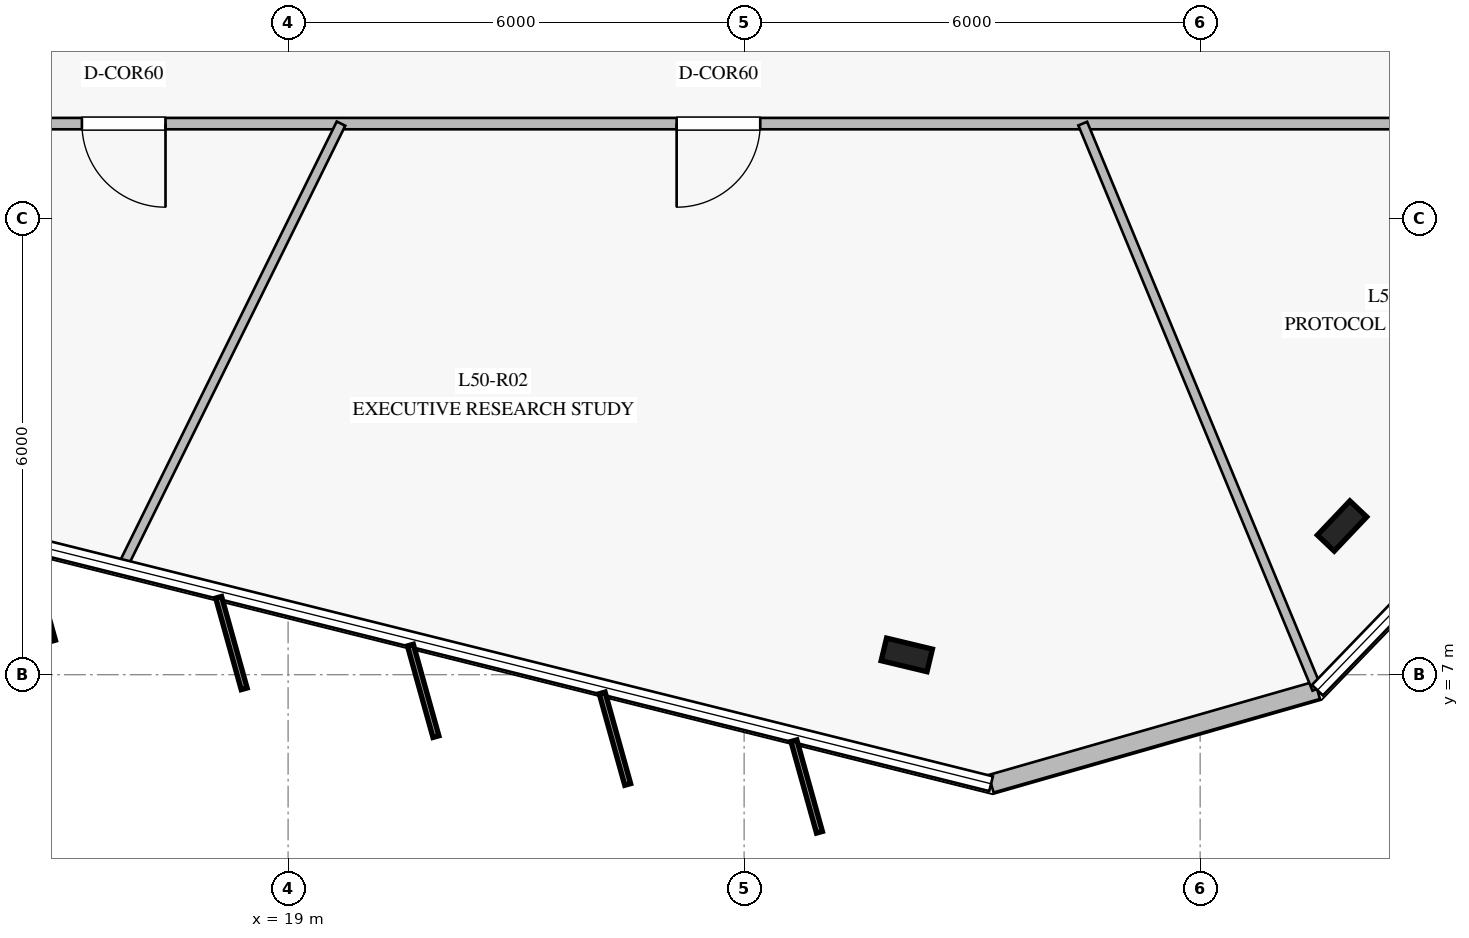
"""IFC4 building model, lengths in metres.
Left out: names, types, materials, properties, quantities, classifications, styles, units other than length and angle.
Written with IfcOpenShell. Run it as: python <this file> out.ifc"""

import sys

from ifc_helpers import new_model, si_unit, direction, frame, frame_2d, origin, origin_2d, place, context, subcontext, project, spatial, rectangle, i_section, extrude, element, fill, save


model = new_model("IFC4")
c1 = context("Model", 3, precision=1e-05, world=origin(), true_north=direction((0.0, 1.0)))
c2 = subcontext(c1, "Body", "Model", "MODEL_VIEW")
j1 = project(units=[si_unit("LENGTHUNIT", "METRE"), si_unit("PLANEANGLEUNIT", "RADIAN")], contexts=[c1])
p1 = place(None, origin())
s1 = spatial("IfcSite", under=j1, at=p1, CompositionType="ELEMENT")
p2 = place(p1, origin())
s2 = spatial("IfcBuilding", under=s1, at=p2, CompositionType="ELEMENT")
p3 = place(p2, frame((0.0, 0.0, 208.8)))
s3 = spatial("IfcBuildingStorey", under=s2, at=p3, CompositionType="ELEMENT", Elevation=208.8)
for number, where, z_axis, x_axis in (
    (1, (27.14, 7.26, 0.0), (0.0, 0.0, 1.0), (-0.972, 0.233, 0.0)),
    (2, (32.867, 8.956, 0.0), (0.0, 0.0, 1.0), (0.688, 0.725, 0.0)),
):
    element("IfcColumn", number, at=place(p3, frame(where, z_axis=z_axis, x_axis=x_axis)), inside=s3, PredefinedType="COLUMN", context=c2, shape_type="SweptSolid", body=[
        extrude(i_section(OverallWidth=0.305, OverallDepth=0.62, WebThickness=0.021, FlangeThickness=0.04, at=origin_2d()), origin(), (0.0, 0.0, 1.0), 4.0),
    ])
p4 = place(p3, frame((28.249, 5.565, 0.0), z_axis=(0.0, 0.0, 1.0), x_axis=(0.961280198868, 0.275572820258, 0.0)))
e3 = element("IfcWall", 3, at=p4, inside=s3, PredefinedType="STANDARD", context=c2, shape_type="SweptSolid", body=[
    extrude(rectangle(XDim=4.467, YDim=0.24, at=frame_2d((2.233, 0.0))), origin(), (0.0, 0.0, 1.0), 3.78),
])
p5 = place(p3, frame((36.35, 14.25, 0.0), z_axis=(0.0, 0.0, 1.0), x_axis=(-1.0, 0.0, 0.0)))
e4 = element("IfcWall", 4, at=p5, inside=s3, PredefinedType="PARTITIONING", context=c2, shape_type="SweptSolid", body=[
    extrude(rectangle(XDim=22.7, YDim=0.15, at=frame_2d((11.35, 0.0))), origin(), (0.0, 0.0, 1.0), 3.28),
])
p6 = place(p5, frame((18.963, 0.0, 0.0)))
e5 = element("IfcOpeningElement", 5, at=p6, cuts=e4, PredefinedType="OPENING", context=c2, shape_type="SweptSolid", body=[
    extrude(rectangle(XDim=1.1, YDim=2.2, at=frame_2d((0.55, 1.1))), frame((0.0, 0.085, 0.0), z_axis=(0.0, -1.0, 0.0), x_axis=(1.0, 0.0, 0.0)), (0.0, 0.0, 1.0), 0.17),
])
p7 = place(p5, frame((11.138, 0.0, 0.0)))
e6 = element("IfcOpeningElement", 6, at=p7, cuts=e4, PredefinedType="OPENING", context=c2, shape_type="SweptSolid", body=[
    extrude(rectangle(XDim=1.1, YDim=2.2, at=frame_2d((0.55, 1.1))), frame((0.0, 0.085, 0.0), z_axis=(0.0, -1.0, 0.0), x_axis=(1.0, 0.0, 0.0)), (0.0, 0.0, 1.0), 0.17),
])
p8 = place(p3, frame((19.696, 14.25, 0.0), z_axis=(0.0, 0.0, 1.0), x_axis=(-0.442406889635, -0.896814442348, 0.0)))
e7 = element("IfcWall", 7, at=p8, inside=s3, PredefinedType="PARTITIONING", context=c2, shape_type="SweptSolid", body=[
    extrude(rectangle(XDim=6.49, YDim=0.125, at=frame_2d((3.245, 0.0))), origin(), (0.0, 0.0, 1.0), 3.18),
])
p9 = place(p3, frame((29.455, 14.25, 0.0), z_axis=(0.0, 0.0, 1.0), x_axis=(0.382715181566, -0.923866380923, 0.0)))
e8 = element("IfcWall", 8, at=p9, inside=s3, PredefinedType="PARTITIONING", context=c2, shape_type="SweptSolid", body=[
    extrude(rectangle(XDim=8.05, YDim=0.125, at=frame_2d((4.025, 0.0))), origin(), (0.0, 0.0, 1.0), 3.18),
])
p10 = place(p6, origin())
e9 = element("IfcDoor", 9, at=p10, inside=s3, OperationType="SINGLE_SWING_LEFT", PredefinedType="DOOR", context=c2, shape_type="SweptSolid", body=[
    extrude(rectangle(XDim=1.1, YDim=2.2, at=frame_2d((0.55, 1.1))), frame((0.0, 0.025, 0.0), z_axis=(0.0, -1.0, 0.0), x_axis=(1.0, 0.0, 0.0)), (0.0, 0.0, 1.0), 0.05),
])
fill(e5, e9)
p11 = place(p7, origin())
e10 = element("IfcDoor", 10, at=p11, inside=s3, OperationType="SINGLE_SWING_RIGHT", PredefinedType="DOOR", context=c2, shape_type="SweptSolid", body=[
    extrude(rectangle(XDim=1.1, YDim=2.2, at=frame_2d((0.55, 1.1))), frame((0.0, 0.025, 0.0), z_axis=(0.0, -1.0, 0.0), x_axis=(1.0, 0.0, 0.0)), (0.0, 0.0, 1.0), 0.05),
])
fill(e6, e10)
save(model, sys.argv[1])
